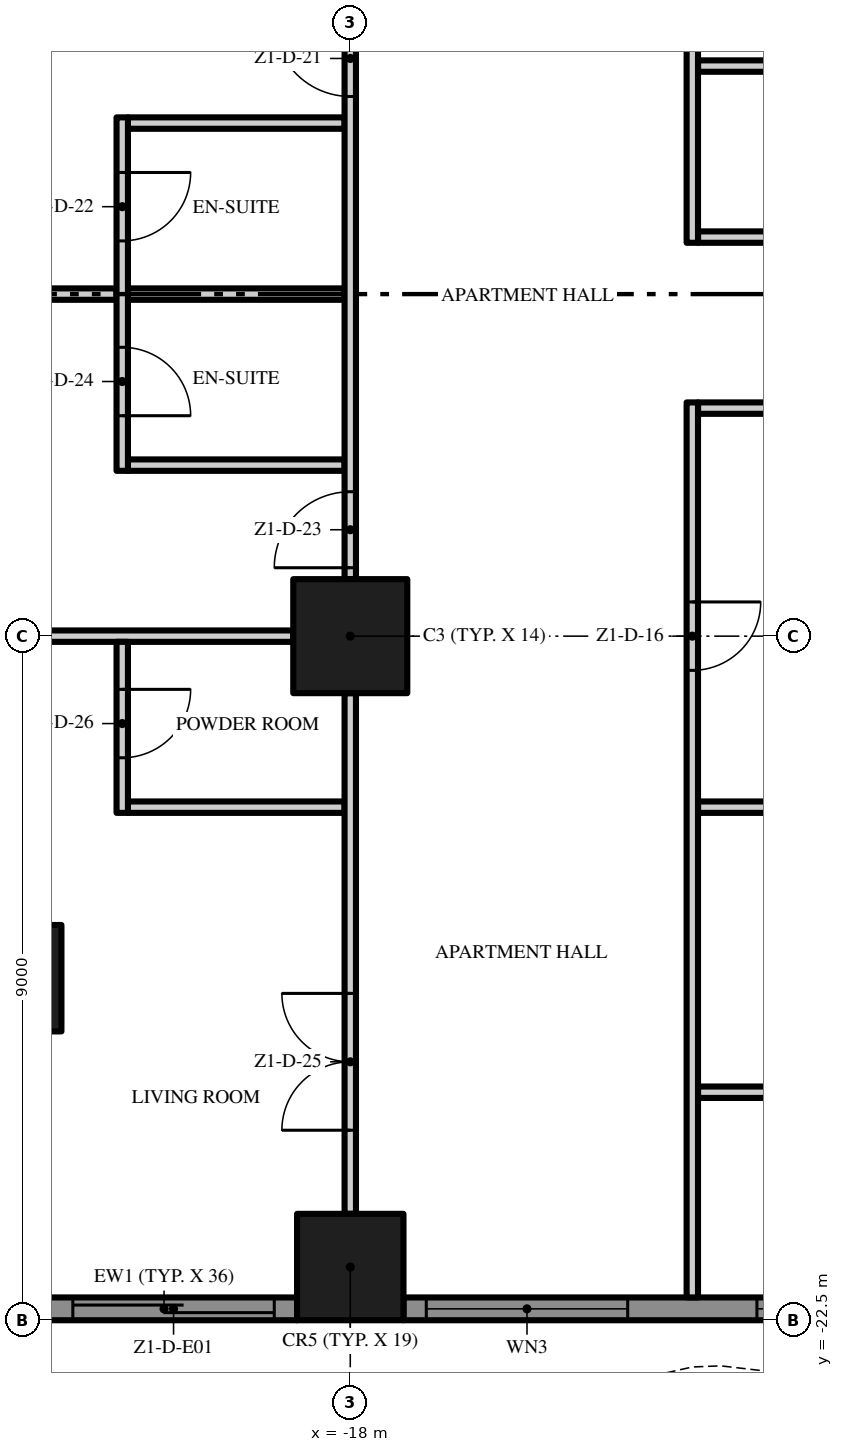
"""IFC4 building model, lengths in metres.
Left out: names, types, materials, properties, quantities, classifications, styles, units other than length and angle.
Written with IfcOpenShell. Run it as: python <this file> out.ifc"""

import sys

from ifc_helpers import new_model, si_unit, direction, frame, frame_2d, origin, origin_2d, place, context, subcontext, project, spatial, polyline, rectangle, outline, extrude, element, fill, save


model = new_model("IFC4")
c1 = context("Model", 3, precision=1e-05, world=origin(), true_north=direction((0.0, 1.0)))
c2 = subcontext(c1, "Body", "Model", "MODEL_VIEW")
j1 = project(units=[si_unit("LENGTHUNIT", "METRE"), si_unit("PLANEANGLEUNIT", "RADIAN")], contexts=[c1])
p1 = place(None, origin())
s1 = spatial("IfcSite", under=j1, at=p1, CompositionType="ELEMENT")
p2 = place(p1, origin())
s2 = spatial("IfcBuilding", under=s1, at=p2, CompositionType="ELEMENT")
p3 = place(p2, frame((0.0, 0.0, 49.2)))
s3 = spatial("IfcBuildingStorey", under=s2, at=p3, CompositionType="ELEMENT", Elevation=49.2)
p4 = place(p3, frame((-18.0, -13.5, 0.0), z_axis=(0.0, 0.0, 1.0), x_axis=(1.0, 0.0, 0.0)))
e1 = element("IfcColumn", 1, at=p4, inside=s3, PredefinedType="COLUMN", context=c2, shape_type="SweptSolid", body=[
    extrude(rectangle(XDim=1.5, YDim=1.5, at=origin_2d()), origin(), (0.0, 0.0, 1.0), 3.5),
])
for number, where, z_axis, x_axis in (
    (2, (-18.0, -21.8, 0.0), (0.0, 0.0, 1.0), (1.0, 0.0, 0.0)),
    (3, (-22.5, -18.0, 0.0), (0.0, 0.0, 1.0), (1.0, 0.0, 0.0)),
):
    element("IfcColumn", number, at=place(p3, frame(where, z_axis=z_axis, x_axis=x_axis)), inside=s3, PredefinedType="COLUMN", context=c2, shape_type="SweptSolid", body=[
        extrude(rectangle(XDim=1.4, YDim=1.4, at=origin_2d()), origin(), (0.0, 0.0, 1.0), 3.5),
    ])
p5 = place(p3, frame((-18.7, -22.35, 0.0), z_axis=(0.0, 0.0, 1.0), x_axis=(-1.0, 0.0, 0.0)))
e4 = element("IfcWall", 4, at=p5, inside=s3, PredefinedType="SOLIDWALL", context=c2, shape_type="SweptSolid", body=[
    extrude(rectangle(XDim=3.5, YDim=0.3, at=frame_2d((1.75, 0.0))), origin(), (0.0, 0.0, 1.0), 3.5),
])
p6 = place(p5, frame((0.3, 0.0, 0.0)))
e5 = element("IfcOpeningElement", 5, at=p6, cuts=e4, PredefinedType="OPENING", context=c2, shape_type="SweptSolid", body=[
    extrude(rectangle(XDim=2.65, YDim=2.4, at=frame_2d((1.325, 1.2))), frame((0.0, 0.16, 0.0), z_axis=(0.0, -1.0, 0.0), x_axis=(1.0, 0.0, 0.0)), (0.0, 0.0, 1.0), 0.32),
])
p7 = place(p3, frame((-9.7, -22.35, 0.0), z_axis=(0.0, 0.0, 1.0), x_axis=(-1.0, 0.0, 0.0)))
e6 = element("IfcWall", 6, at=p7, inside=s3, PredefinedType="SOLIDWALL", context=c2, shape_type="SweptSolid", body=[
    extrude(rectangle(XDim=7.6, YDim=0.3, at=frame_2d((3.8, 0.0))), origin(), (0.0, 0.0, 1.0), 3.5),
])
p8 = place(p7, frame((4.65, 0.0, 0.45)))
e7 = element("IfcOpeningElement", 7, at=p8, cuts=e6, PredefinedType="OPENING", context=c2, shape_type="SweptSolid", body=[
    extrude(rectangle(XDim=2.65, YDim=2.65, at=frame_2d((1.325, 1.325))), frame((0.0, 0.16, 0.0), z_axis=(0.0, -1.0, 0.0), x_axis=(1.0, 0.0, 0.0)), (0.0, 0.0, 1.0), 0.32),
])
p9 = place(p7, frame((0.3, 0.0, 0.45)))
e8 = element("IfcOpeningElement", 8, at=p9, cuts=e6, PredefinedType="OPENING", context=c2, shape_type="SweptSolid", body=[
    extrude(rectangle(XDim=2.65, YDim=2.65, at=frame_2d((1.325, 1.325))), frame((0.0, 0.16, 0.0), z_axis=(0.0, -1.0, 0.0), x_axis=(1.0, 0.0, 0.0)), (0.0, 0.0, 1.0), 0.32),
])
p10 = place(p3, origin())
e9 = element("IfcWall", 9, at=p10, inside=s3, PredefinedType="USERDEFINED", context=c2, shape_type="SweptSolid", body=[
    extrude(outline(polyline([(-22.5, -25.149), (-21.0, -25.485), (-20.625, -25.5), (-19.5, -25.369), (-18.0, -24.845), (-16.5, -24.112), (-15.0, -23.451), (-13.5, -23.115), (-13.125, -23.1), (-12.0, -23.231), (-10.5, -23.755), (-9.0, -24.488), (-7.5, -25.149), (-6.0, -25.485), (-5.625, -25.5), (-4.5, -25.369), (-3.0, -24.845), (-1.5, -24.112), (0.0, -23.451), (1.5, -23.115), (1.875, -23.1), (3.0, -23.231), (4.5, -23.755), (6.0, -24.488), (7.5, -25.149), (9.0, -25.485), (9.375, -25.5), (10.5, -25.369), (12.0, -24.845), (13.5, -24.112), (15.0, -23.451), (16.5, -23.115), (16.875, -23.1), (18.0, -23.231), (19.5, -23.755), (21.0, -24.488), (22.5, -25.149), (22.601, -24.92), (21.105, -24.261), (19.596, -23.524), (18.056, -22.986), (16.885, -22.849), (16.467, -22.866), (14.921, -23.213), (13.395, -23.885), (11.904, -24.614), (10.444, -25.124), (9.365, -25.249), (9.033, -25.236), (7.579, -24.91), (6.105, -24.261), (4.596, -23.524), (3.056, -22.986), (1.885, -22.849), (1.467, -22.866), (-0.079, -23.213), (-1.605, -23.885), (-3.096, -24.614), (-4.556, -25.124), (-5.635, -25.249), (-5.967, -25.236), (-7.421, -24.91), (-8.895, -24.261), (-10.404, -23.524), (-11.944, -22.986), (-13.115, -22.849), (-13.533, -22.866), (-15.079, -23.213), (-16.605, -23.885), (-18.096, -24.614), (-19.556, -25.124), (-20.635, -25.249), (-20.967, -25.236), (-22.445, -24.905), (-22.5, -25.149)])), origin(), (0.0, 0.0, 1.0), 0.9),
])
p11 = place(p3, frame((-13.425, -19.5, 0.0), z_axis=(0.0, 0.0, 1.0), x_axis=(1.0, 0.0, 0.0)))
e10 = element("IfcWall", 10, at=p11, inside=s3, PredefinedType="PARTITIONING", context=c2, shape_type="SweptSolid", body=[
    extrude(rectangle(XDim=4.35, YDim=0.15, at=frame_2d((2.175, 0.0))), origin(), (0.0, 0.0, 1.0), 3.5),
])
p12 = place(p3, frame((-20.925, -15.75, 0.0), z_axis=(0.0, 0.0, 1.0), x_axis=(1.0, 0.0, 0.0)))
e11 = element("IfcWall", 11, at=p12, inside=s3, PredefinedType="PARTITIONING", context=c2, shape_type="SweptSolid", body=[
    extrude(rectangle(XDim=2.85, YDim=0.15, at=frame_2d((1.425, 0.0))), origin(), (0.0, 0.0, 1.0), 3.5),
])
p13 = place(p3, frame((-9.075, -15.75, 0.0), z_axis=(0.0, 0.0, 1.0), x_axis=(-1.0, 0.0, 0.0)))
e12 = element("IfcWall", 12, at=p13, inside=s3, PredefinedType="PARTITIONING", context=c2, shape_type="SweptSolid", body=[
    extrude(rectangle(XDim=4.35, YDim=0.15, at=frame_2d((2.175, 0.0))), origin(), (0.0, 0.0, 1.0), 3.5),
])
p14 = place(p13, frame((1.7, 0.0, 0.0)))
e13 = element("IfcOpeningElement", 13, at=p14, cuts=e12, PredefinedType="OPENING", context=c2, shape_type="SweptSolid", body=[
    extrude(rectangle(XDim=0.9, YDim=2.1, at=frame_2d((0.45, 1.05))), frame((0.0, 0.085, 0.0), z_axis=(0.0, -1.0, 0.0), x_axis=(1.0, 0.0, 0.0)), (0.0, 0.0, 1.0), 0.17),
])
p15 = place(p3, frame((-25.6, -13.5, 0.0), z_axis=(0.0, 0.0, 1.0), x_axis=(1.0, 0.0, 0.0)))
e14 = element("IfcWall", 14, at=p15, inside=s3, PredefinedType="PARTITIONING", context=c2, shape_type="SweptSolid", body=[
    extrude(rectangle(XDim=6.85, YDim=0.15, at=frame_2d((3.425, 0.0))), origin(), (0.0, 0.0, 1.0), 3.5),
])
p16 = place(p3, frame((-20.925, -11.25, 0.0), z_axis=(0.0, 0.0, 1.0), x_axis=(1.0, 0.0, 0.0)))
e15 = element("IfcWall", 15, at=p16, inside=s3, PredefinedType="PARTITIONING", context=c2, shape_type="SweptSolid", body=[
    extrude(rectangle(XDim=2.85, YDim=0.15, at=frame_2d((1.425, 0.0))), origin(), (0.0, 0.0, 1.0), 3.5),
])
p17 = place(p3, frame((-13.425, -10.5, 0.0), z_axis=(0.0, 0.0, 1.0), x_axis=(1.0, 0.0, 0.0)))
e16 = element("IfcWall", 16, at=p17, inside=s3, PredefinedType="PARTITIONING", context=c2, shape_type="SweptSolid", body=[
    extrude(rectangle(XDim=4.35, YDim=0.15, at=frame_2d((2.175, 0.0))), origin(), (0.0, 0.0, 1.0), 3.5),
])
p18 = place(p3, frame((-26.7, -9.0, 0.0), z_axis=(0.0, 0.0, 1.0), x_axis=(1.0, 0.0, 0.0)))
e17 = element("IfcWall", 17, at=p18, inside=s3, PredefinedType="PARTITIONING", context=c2, shape_type="SweptSolid", body=[
    extrude(rectangle(XDim=5.625, YDim=0.15, at=frame_2d((2.812, 0.0))), origin(), (0.0, 0.0, 1.0), 3.5),
])
p19 = place(p3, frame((-20.925, -9.0, 0.0), z_axis=(0.0, 0.0, 1.0), x_axis=(1.0, 0.0, 0.0)))
e18 = element("IfcWall", 18, at=p19, inside=s3, PredefinedType="PARTITIONING", context=c2, shape_type="SweptSolid", body=[
    extrude(rectangle(XDim=2.85, YDim=0.15, at=frame_2d((1.425, 0.0))), origin(), (0.0, 0.0, 1.0), 3.5),
])
p20 = place(p3, frame((-13.425, -8.25, 0.0), z_axis=(0.0, 0.0, 1.0), x_axis=(1.0, 0.0, 0.0)))
e19 = element("IfcWall", 19, at=p20, inside=s3, PredefinedType="PARTITIONING", context=c2, shape_type="SweptSolid", body=[
    extrude(rectangle(XDim=4.35, YDim=0.15, at=frame_2d((2.175, 0.0))), origin(), (0.0, 0.0, 1.0), 3.5),
])
p21 = place(p20, frame((1.75, 0.0, 0.0)))
e20 = element("IfcOpeningElement", 20, at=p21, cuts=e19, PredefinedType="OPENING", context=c2, shape_type="SweptSolid", body=[
    extrude(rectangle(XDim=0.9, YDim=2.1, at=frame_2d((0.45, 1.05))), frame((0.0, 0.085, 0.0), z_axis=(0.0, -1.0, 0.0), x_axis=(1.0, 0.0, 0.0)), (0.0, 0.0, 1.0), 0.17),
])
p22 = place(p3, frame((-20.925, -6.75, 0.0), z_axis=(0.0, 0.0, 1.0), x_axis=(1.0, 0.0, 0.0)))
e21 = element("IfcWall", 21, at=p22, inside=s3, PredefinedType="PARTITIONING", context=c2, shape_type="SweptSolid", body=[
    extrude(rectangle(XDim=2.85, YDim=0.15, at=frame_2d((1.425, 0.0))), origin(), (0.0, 0.0, 1.0), 3.5),
])
p23 = place(p3, frame((-13.425, -6.0, 0.0), z_axis=(0.0, 0.0, 1.0), x_axis=(1.0, 0.0, 0.0)))
e22 = element("IfcWall", 22, at=p23, inside=s3, PredefinedType="PARTITIONING", context=c2, shape_type="SweptSolid", body=[
    extrude(rectangle(XDim=4.35, YDim=0.15, at=frame_2d((2.175, 0.0))), origin(), (0.0, 0.0, 1.0), 3.5),
])
p24 = place(p3, frame((-21.0, -13.575, 0.0), z_axis=(0.0, 0.0, 1.0), x_axis=(0.0, -1.0, 0.0)))
e23 = element("IfcWall", 23, at=p24, inside=s3, PredefinedType="PARTITIONING", context=c2, shape_type="SweptSolid", body=[
    extrude(rectangle(XDim=2.25, YDim=0.15, at=frame_2d((1.125, 0.0))), origin(), (0.0, 0.0, 1.0), 3.5),
])
p25 = place(p24, frame((0.625, 0.0, 0.0)))
e24 = element("IfcOpeningElement", 24, at=p25, cuts=e23, PredefinedType="OPENING", context=c2, shape_type="SweptSolid", body=[
    extrude(rectangle(XDim=0.9, YDim=2.1, at=frame_2d((0.45, 1.05))), frame((0.0, 0.085, 0.0), z_axis=(0.0, -1.0, 0.0), x_axis=(1.0, 0.0, 0.0)), (0.0, 0.0, 1.0), 0.17),
])
p26 = place(p3, frame((-21.0, -6.675, 0.0), z_axis=(0.0, 0.0, 1.0), x_axis=(0.0, -1.0, 0.0)))
e25 = element("IfcWall", 25, at=p26, inside=s3, PredefinedType="PARTITIONING", context=c2, shape_type="SweptSolid", body=[
    extrude(rectangle(XDim=4.65, YDim=0.15, at=frame_2d((2.325, 0.0))), origin(), (0.0, 0.0, 1.0), 3.5),
])
p27 = place(p26, frame((0.725, 0.0, 0.0)))
e26 = element("IfcOpeningElement", 26, at=p27, cuts=e25, PredefinedType="OPENING", context=c2, shape_type="SweptSolid", body=[
    extrude(rectangle(XDim=0.9, YDim=2.1, at=frame_2d((0.45, 1.05))), frame((0.0, 0.085, 0.0), z_axis=(0.0, -1.0, 0.0), x_axis=(1.0, 0.0, 0.0)), (0.0, 0.0, 1.0), 0.17),
])
p28 = place(p26, frame((3.025, 0.0, 0.0)))
e27 = element("IfcOpeningElement", 27, at=p28, cuts=e25, PredefinedType="OPENING", context=c2, shape_type="SweptSolid", body=[
    extrude(rectangle(XDim=0.9, YDim=2.1, at=frame_2d((0.45, 1.05))), frame((0.0, 0.085, 0.0), z_axis=(0.0, -1.0, 0.0), x_axis=(1.0, 0.0, 0.0)), (0.0, 0.0, 1.0), 0.17),
])
p29 = place(p3, frame((-18.0, -21.1, 0.0), z_axis=(0.0, 0.0, 1.0), x_axis=(0.0, 1.0, 0.0)))
e28 = element("IfcWall", 28, at=p29, inside=s3, PredefinedType="PARTITIONING", context=c2, shape_type="SweptSolid", body=[
    extrude(rectangle(XDim=6.85, YDim=0.15, at=frame_2d((3.425, 0.0))), origin(), (0.0, 0.0, 1.0), 3.5),
])
p30 = place(p29, frame((1.1, 0.0, 0.0)))
e29 = element("IfcOpeningElement", 29, at=p30, cuts=e28, PredefinedType="OPENING", context=c2, shape_type="SweptSolid", body=[
    extrude(rectangle(XDim=1.8, YDim=2.4, at=frame_2d((0.9, 1.2))), frame((0.0, 0.085, 0.0), z_axis=(0.0, -1.0, 0.0), x_axis=(1.0, 0.0, 0.0)), (0.0, 0.0, 1.0), 0.17),
])
p31 = place(p3, frame((-18.0, -12.75, 0.0), z_axis=(0.0, 0.0, 1.0), x_axis=(0.0, 1.0, 0.0)))
e30 = element("IfcWall", 30, at=p31, inside=s3, PredefinedType="PARTITIONING", context=c2, shape_type="SweptSolid", body=[
    extrude(rectangle(XDim=7.5, YDim=0.15, at=frame_2d((3.75, 0.0))), origin(), (0.0, 0.0, 1.0), 3.5),
])
p32 = place(p31, frame((6.35, 0.0, 0.0)))
e31 = element("IfcOpeningElement", 31, at=p32, cuts=e30, PredefinedType="OPENING", context=c2, shape_type="SweptSolid", body=[
    extrude(rectangle(XDim=1.0, YDim=2.4, at=frame_2d((0.5, 1.2))), frame((0.0, 0.085, 0.0), z_axis=(0.0, -1.0, 0.0), x_axis=(1.0, 0.0, 0.0)), (0.0, 0.0, 1.0), 0.17),
])
p33 = place(p31, frame((0.15, 0.0, 0.0)))
e32 = element("IfcOpeningElement", 32, at=p33, cuts=e30, PredefinedType="OPENING", context=c2, shape_type="SweptSolid", body=[
    extrude(rectangle(XDim=1.0, YDim=2.4, at=frame_2d((0.5, 1.2))), frame((0.0, 0.085, 0.0), z_axis=(0.0, -1.0, 0.0), x_axis=(1.0, 0.0, 0.0)), (0.0, 0.0, 1.0), 0.17),
])
p34 = place(p3, frame((-13.5, -10.425, 0.0), z_axis=(0.0, 0.0, 1.0), x_axis=(0.0, -1.0, 0.0)))
e33 = element("IfcWall", 33, at=p34, inside=s3, PredefinedType="PARTITIONING", context=c2, shape_type="SweptSolid", body=[
    extrude(rectangle(XDim=11.775, YDim=0.15, at=frame_2d((5.888, 0.0))), origin(), (0.0, 0.0, 1.0), 3.5),
])
p35 = place(p34, frame((2.625, 0.0, 0.0)))
e34 = element("IfcOpeningElement", 34, at=p35, cuts=e33, PredefinedType="OPENING", context=c2, shape_type="SweptSolid", body=[
    extrude(rectangle(XDim=0.9, YDim=2.1, at=frame_2d((0.45, 1.05))), frame((0.0, 0.085, 0.0), z_axis=(0.0, -1.0, 0.0), x_axis=(1.0, 0.0, 0.0)), (0.0, 0.0, 1.0), 0.17),
])
p36 = place(p3, frame((-13.5, -8.325, 0.0), z_axis=(0.0, 0.0, 1.0), x_axis=(0.0, 1.0, 0.0)))
e35 = element("IfcWall", 35, at=p36, inside=s3, PredefinedType="PARTITIONING", context=c2, shape_type="SweptSolid", body=[
    extrude(rectangle(XDim=8.225, YDim=0.15, at=frame_2d((4.112, 0.0))), origin(), (0.0, 0.0, 1.0), 3.5),
])
p37 = place(p6, origin())
e36 = element("IfcDoor", 36, at=p37, inside=s3, OperationType="SINGLE_SWING_LEFT", PredefinedType="DOOR", context=c2, shape_type="SweptSolid", body=[
    extrude(rectangle(XDim=2.65, YDim=2.4, at=frame_2d((1.325, 1.2))), frame((0.0, 0.025, 0.0), z_axis=(0.0, -1.0, 0.0), x_axis=(1.0, 0.0, 0.0)), (0.0, 0.0, 1.0), 0.05),
])
fill(e5, e36)
p38 = place(p8, origin())
e37 = element("IfcWindow", 37, at=p38, inside=s3, PartitioningType="SINGLE_PANEL", PredefinedType="WINDOW", context=c2, shape_type="SweptSolid", body=[
    extrude(rectangle(XDim=2.65, YDim=2.65, at=frame_2d((1.325, 1.325))), frame((0.0, 0.03, 0.0), z_axis=(0.0, -1.0, 0.0), x_axis=(1.0, 0.0, 0.0)), (0.0, 0.0, 1.0), 0.06),
])
fill(e7, e37)
p39 = place(p9, origin())
e38 = element("IfcWindow", 38, at=p39, inside=s3, PartitioningType="SINGLE_PANEL", PredefinedType="WINDOW", context=c2, shape_type="SweptSolid", body=[
    extrude(rectangle(XDim=2.65, YDim=2.65, at=frame_2d((1.325, 1.325))), frame((0.0, 0.03, 0.0), z_axis=(0.0, -1.0, 0.0), x_axis=(1.0, 0.0, 0.0)), (0.0, 0.0, 1.0), 0.06),
])
fill(e8, e38)
p40 = place(p35, origin())
e39 = element("IfcDoor", 39, at=p40, inside=s3, OperationType="SINGLE_SWING_LEFT", PredefinedType="DOOR", context=c2, shape_type="SweptSolid", body=[
    extrude(rectangle(XDim=0.9, YDim=2.1, at=frame_2d((0.45, 1.05))), frame((0.0, 0.025, 0.0), z_axis=(0.0, -1.0, 0.0), x_axis=(1.0, 0.0, 0.0)), (0.0, 0.0, 1.0), 0.05),
])
fill(e34, e39)
p41 = place(p32, origin())
e40 = element("IfcDoor", 40, at=p41, inside=s3, OperationType="SINGLE_SWING_RIGHT", PredefinedType="DOOR", context=c2, shape_type="SweptSolid", body=[
    extrude(rectangle(XDim=1.0, YDim=2.4, at=frame_2d((0.5, 1.2))), frame((0.0, 0.025, 0.0), z_axis=(0.0, -1.0, 0.0), x_axis=(1.0, 0.0, 0.0)), (0.0, 0.0, 1.0), 0.05),
])
fill(e31, e40)
p42 = place(p27, origin())
e41 = element("IfcDoor", 41, at=p42, inside=s3, OperationType="SINGLE_SWING_LEFT", PredefinedType="DOOR", context=c2, shape_type="SweptSolid", body=[
    extrude(rectangle(XDim=0.9, YDim=2.1, at=frame_2d((0.45, 1.05))), frame((0.0, 0.025, 0.0), z_axis=(0.0, -1.0, 0.0), x_axis=(1.0, 0.0, 0.0)), (0.0, 0.0, 1.0), 0.05),
])
fill(e26, e41)
p43 = place(p33, origin())
e42 = element("IfcDoor", 42, at=p43, inside=s3, OperationType="SINGLE_SWING_LEFT", PredefinedType="DOOR", context=c2, shape_type="SweptSolid", body=[
    extrude(rectangle(XDim=1.0, YDim=2.4, at=frame_2d((0.5, 1.2))), frame((0.0, 0.025, 0.0), z_axis=(0.0, -1.0, 0.0), x_axis=(1.0, 0.0, 0.0)), (0.0, 0.0, 1.0), 0.05),
])
fill(e32, e42)
p44 = place(p28, origin())
e43 = element("IfcDoor", 43, at=p44, inside=s3, OperationType="SINGLE_SWING_RIGHT", PredefinedType="DOOR", context=c2, shape_type="SweptSolid", body=[
    extrude(rectangle(XDim=0.9, YDim=2.1, at=frame_2d((0.45, 1.05))), frame((0.0, 0.025, 0.0), z_axis=(0.0, -1.0, 0.0), x_axis=(1.0, 0.0, 0.0)), (0.0, 0.0, 1.0), 0.05),
])
fill(e27, e43)
p45 = place(p30, origin())
e44 = element("IfcDoor", 44, at=p45, inside=s3, OperationType="DOUBLE_DOOR_SINGLE_SWING", PredefinedType="DOOR", context=c2, shape_type="SweptSolid", body=[
    extrude(rectangle(XDim=1.8, YDim=2.4, at=frame_2d((0.9, 1.2))), frame((0.0, 0.025, 0.0), z_axis=(0.0, -1.0, 0.0), x_axis=(1.0, 0.0, 0.0)), (0.0, 0.0, 1.0), 0.05),
])
fill(e29, e44)
p46 = place(p25, origin())
e45 = element("IfcDoor", 45, at=p46, inside=s3, OperationType="SINGLE_SWING_LEFT", PredefinedType="DOOR", context=c2, shape_type="SweptSolid", body=[
    extrude(rectangle(XDim=0.9, YDim=2.1, at=frame_2d((0.45, 1.05))), frame((0.0, 0.025, 0.0), z_axis=(0.0, -1.0, 0.0), x_axis=(1.0, 0.0, 0.0)), (0.0, 0.0, 1.0), 0.05),
])
fill(e24, e45)
save(model, sys.argv[1])
